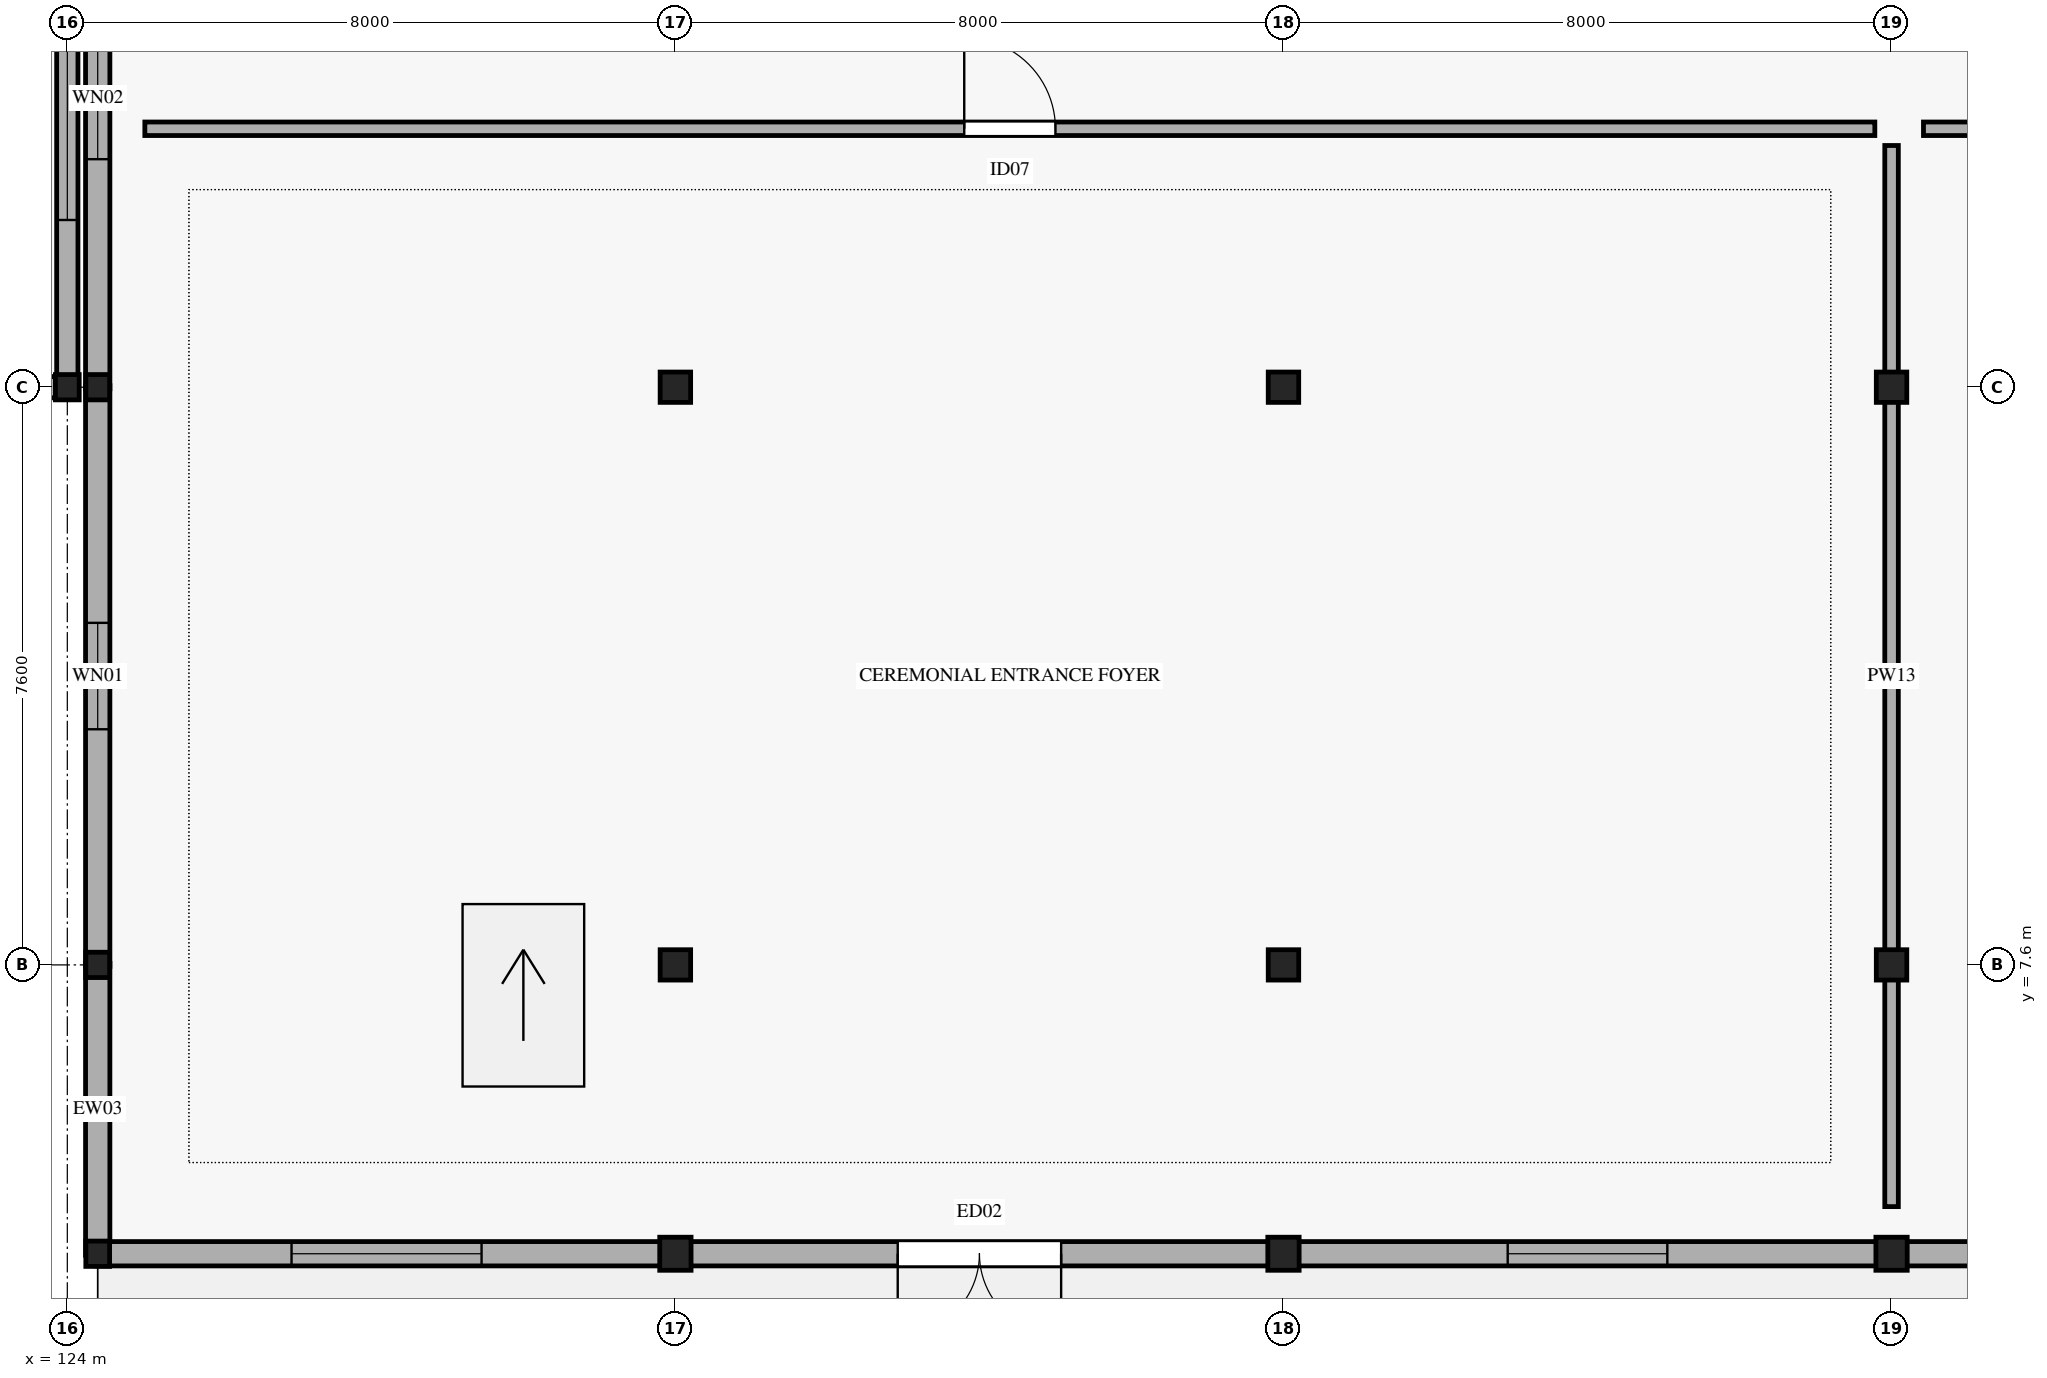
"""IFC4 building model, lengths in metres.
Left out: names, types, materials, properties, quantities, classifications, styles, units other than length and angle.
Written with IfcOpenShell. Run it as: python <this file> out.ifc"""

import sys

from ifc_helpers import new_model, si_unit, direction, frame, frame_2d, origin, origin_2d, place, context, subcontext, project, spatial, rectangle, i_section, extrude, element, fill, save


model = new_model("IFC4")
c1 = context("Model", 3, precision=1e-05, world=origin(), true_north=direction((0.0, 1.0)))
c2 = subcontext(c1, "Body", "Model", "MODEL_VIEW")
j1 = project(units=[si_unit("LENGTHUNIT", "METRE"), si_unit("PLANEANGLEUNIT", "RADIAN")], contexts=[c1])
p1 = place(None, origin())
s1 = spatial("IfcSite", under=j1, at=p1, CompositionType="ELEMENT")
p2 = place(p1, origin())
s2 = spatial("IfcBuilding", under=s1, at=p2, CompositionType="ELEMENT")
p3 = place(p2, origin())
s3 = spatial("IfcBuildingStorey", under=s2, at=p3, CompositionType="ELEMENT", Elevation=0.0)
for number, where, z_axis, x_axis in (
    (1, (124.4, 3.8, 0.0), (0.0, 0.0, 1.0), (1.0, 0.0, 0.0)),
    (2, (124.4, 7.6, 0.0), (0.0, 0.0, 1.0), (1.0, 0.0, 0.0)),
    (3, (124.4, 15.2, 0.0), (0.0, 0.0, 1.0), (1.0, 0.0, 0.0)),
):
    element("IfcColumn", number, at=place(p3, frame(where, z_axis=z_axis, x_axis=x_axis)), inside=s3, PredefinedType="COLUMN", context=c2, shape_type="SweptSolid", body=[
        extrude(i_section(OverallWidth=0.313, OverallDepth=0.333, WebThickness=0.018, FlangeThickness=0.028, FilletRadius=0.015, at=origin_2d()), origin(), (0.0, 0.0, 1.0), 5.185),
    ])
p4 = place(p3, frame((132.0, 3.8, 0.0), z_axis=(0.0, 0.0, 1.0), x_axis=(1.0, 0.0, 0.0)))
e4 = element("IfcColumn", 4, at=p4, inside=s3, PredefinedType="COLUMN", context=c2, shape_type="SweptSolid", body=[
    extrude(i_section(OverallWidth=0.412, OverallDepth=0.435, WebThickness=0.036, FlangeThickness=0.057, FilletRadius=0.015, at=origin_2d()), origin(), (0.0, 0.0, 1.0), 5.185),
])
for number, where, z_axis, x_axis in (
    (5, (132.0, 7.6, 0.0), (0.0, 0.0, 1.0), (1.0, 0.0, 0.0)),
    (6, (132.0, 15.2, 0.0), (0.0, 0.0, 1.0), (1.0, 0.0, 0.0)),
):
    element("IfcColumn", number, at=place(p3, frame(where, z_axis=z_axis, x_axis=x_axis)), inside=s3, PredefinedType="COLUMN", context=c2, shape_type="SweptSolid", body=[
        extrude(i_section(OverallWidth=0.401, OverallDepth=0.399, WebThickness=0.025, FlangeThickness=0.04, FilletRadius=0.015, at=origin_2d()), origin(), (0.0, 0.0, 1.0), 5.185),
    ])
p5 = place(p3, frame((140.0, 3.8, 0.0), z_axis=(0.0, 0.0, 1.0), x_axis=(1.0, 0.0, 0.0)))
e7 = element("IfcColumn", 7, at=p5, inside=s3, PredefinedType="COLUMN", context=c2, shape_type="SweptSolid", body=[
    extrude(i_section(OverallWidth=0.412, OverallDepth=0.435, WebThickness=0.036, FlangeThickness=0.057, FilletRadius=0.015, at=origin_2d()), origin(), (0.0, 0.0, 1.0), 5.185),
])
for number, where, z_axis, x_axis in (
    (8, (140.0, 7.6, 0.0), (0.0, 0.0, 1.0), (1.0, 0.0, 0.0)),
    (9, (140.0, 15.2, 0.0), (0.0, 0.0, 1.0), (1.0, 0.0, 0.0)),
):
    element("IfcColumn", number, at=place(p3, frame(where, z_axis=z_axis, x_axis=x_axis)), inside=s3, PredefinedType="COLUMN", context=c2, shape_type="SweptSolid", body=[
        extrude(i_section(OverallWidth=0.401, OverallDepth=0.399, WebThickness=0.025, FlangeThickness=0.04, FilletRadius=0.015, at=origin_2d()), origin(), (0.0, 0.0, 1.0), 5.185),
    ])
p6 = place(p3, frame((148.0, 3.8, 0.0), z_axis=(0.0, 0.0, 1.0), x_axis=(1.0, 0.0, 0.0)))
e10 = element("IfcColumn", 10, at=p6, inside=s3, PredefinedType="COLUMN", context=c2, shape_type="SweptSolid", body=[
    extrude(i_section(OverallWidth=0.412, OverallDepth=0.435, WebThickness=0.036, FlangeThickness=0.057, FilletRadius=0.015, at=origin_2d()), origin(), (0.0, 0.0, 1.0), 5.185),
])
for number, where, z_axis, x_axis in (
    (11, (148.0, 7.6, 0.0), (0.0, 0.0, 1.0), (1.0, 0.0, 0.0)),
    (12, (148.0, 15.2, 0.0), (0.0, 0.0, 1.0), (1.0, 0.0, 0.0)),
):
    element("IfcColumn", number, at=place(p3, frame(where, z_axis=z_axis, x_axis=x_axis)), inside=s3, PredefinedType="COLUMN", context=c2, shape_type="SweptSolid", body=[
        extrude(i_section(OverallWidth=0.401, OverallDepth=0.399, WebThickness=0.025, FlangeThickness=0.04, FilletRadius=0.015, at=origin_2d()), origin(), (0.0, 0.0, 1.0), 5.185),
    ])
p7 = place(p3, frame((124.0, 15.2, 0.0), z_axis=(0.0, 0.0, 1.0), x_axis=(1.0, 0.0, 0.0)))
e13 = element("IfcColumn", 13, at=p7, inside=s3, PredefinedType="COLUMN", context=c2, shape_type="SweptSolid", body=[
    extrude(i_section(OverallWidth=0.313, OverallDepth=0.333, WebThickness=0.018, FlangeThickness=0.028, FilletRadius=0.015, at=origin_2d()), origin(), (0.0, 0.0, 1.0), 5.185),
])
p8 = place(p3, frame((124.4, 3.78, 0.0), z_axis=(0.0, 0.0, 1.0), x_axis=(0.0, 1.0, 0.0)))
e14 = element("IfcWall", 14, at=p8, inside=s3, PredefinedType="STANDARD", context=c2, shape_type="SweptSolid", body=[
    extrude(rectangle(XDim=3.84, YDim=0.32, at=frame_2d((1.92, 0.0))), origin(), (0.0, 0.0, 1.0), 4.25),
])
p9 = place(p3, frame((124.4, 7.58, 0.0), z_axis=(0.0, 0.0, 1.0), x_axis=(0.0, 1.0, 0.0)))
e15 = element("IfcWall", 15, at=p9, inside=s3, PredefinedType="STANDARD", context=c2, shape_type="SweptSolid", body=[
    extrude(rectangle(XDim=7.64, YDim=0.32, at=frame_2d((3.82, 0.0))), origin(), (0.0, 0.0, 1.0), 4.25),
])
p10 = place(p9, frame((3.12, 0.0, 0.75)))
e16 = element("IfcOpeningElement", 16, at=p10, cuts=e15, PredefinedType="OPENING", context=c2, shape_type="SweptSolid", body=[
    extrude(rectangle(XDim=1.4, YDim=2.0, at=frame_2d((0.7, 1.0))), frame((0.0, 0.17, 0.0), z_axis=(0.0, -1.0, 0.0), x_axis=(1.0, 0.0, 0.0)), (0.0, 0.0, 1.0), 0.34),
])
p11 = place(p3, frame((124.4, 15.18, 0.0), z_axis=(0.0, 0.0, 1.0), x_axis=(0.0, 1.0, 0.0)))
e17 = element("IfcWall", 17, at=p11, inside=s3, PredefinedType="STANDARD", context=c2, shape_type="SweptSolid", body=[
    extrude(rectangle(XDim=7.64, YDim=0.32, at=frame_2d((3.82, 0.0))), origin(), (0.0, 0.0, 1.0), 4.25),
])
p12 = place(p11, frame((3.02, 0.0, 0.75)))
e18 = element("IfcOpeningElement", 18, at=p12, cuts=e17, PredefinedType="OPENING", context=c2, shape_type="SweptSolid", body=[
    extrude(rectangle(XDim=1.6, YDim=2.0, at=frame_2d((0.8, 1.0))), frame((0.0, 0.17, 0.0), z_axis=(0.0, -1.0, 0.0), x_axis=(1.0, 0.0, 0.0)), (0.0, 0.0, 1.0), 0.34),
])
p13 = place(p3, frame((156.02, 3.8, 0.0), z_axis=(0.0, 0.0, 1.0), x_axis=(-1.0, 0.0, 0.0)))
e19 = element("IfcWall", 19, at=p13, inside=s3, PredefinedType="STANDARD", context=c2, shape_type="SweptSolid", body=[
    extrude(rectangle(XDim=8.04, YDim=0.32, at=frame_2d((4.02, 0.0))), origin(), (0.0, 0.0, 1.0), 4.25),
])
p14 = place(p13, frame((3.145, 0.0, 0.75)))
e20 = element("IfcOpeningElement", 20, at=p14, cuts=e19, PredefinedType="OPENING", context=c2, shape_type="SweptSolid", body=[
    extrude(rectangle(XDim=1.75, YDim=2.15, at=frame_2d((0.875, 1.075))), frame((0.0, 0.17, 0.0), z_axis=(0.0, -1.0, 0.0), x_axis=(1.0, 0.0, 0.0)), (0.0, 0.0, 1.0), 0.34),
])
p15 = place(p3, frame((148.02, 3.8, 0.0), z_axis=(0.0, 0.0, 1.0), x_axis=(-1.0, 0.0, 0.0)))
e21 = element("IfcWall", 21, at=p15, inside=s3, PredefinedType="STANDARD", context=c2, shape_type="SweptSolid", body=[
    extrude(rectangle(XDim=8.04, YDim=0.32, at=frame_2d((4.02, 0.0))), origin(), (0.0, 0.0, 1.0), 4.25),
])
p16 = place(p15, frame((2.97, 0.0, 0.75)))
e22 = element("IfcOpeningElement", 22, at=p16, cuts=e21, PredefinedType="OPENING", context=c2, shape_type="SweptSolid", body=[
    extrude(rectangle(XDim=2.1, YDim=2.15, at=frame_2d((1.05, 1.075))), frame((0.0, 0.17, 0.0), z_axis=(0.0, -1.0, 0.0), x_axis=(1.0, 0.0, 0.0)), (0.0, 0.0, 1.0), 0.34),
])
p17 = place(p3, frame((140.02, 3.8, 0.0), z_axis=(0.0, 0.0, 1.0), x_axis=(-1.0, 0.0, 0.0)))
e23 = element("IfcWall", 23, at=p17, inside=s3, PredefinedType="STANDARD", context=c2, shape_type="SweptSolid", body=[
    extrude(rectangle(XDim=8.04, YDim=0.32, at=frame_2d((4.02, 0.0))), origin(), (0.0, 0.0, 1.0), 4.25),
])
p18 = place(p17, frame((2.945, 0.0, 0.0)))
e24 = element("IfcOpeningElement", 24, at=p18, cuts=e23, PredefinedType="OPENING", context=c2, shape_type="SweptSolid", body=[
    extrude(rectangle(XDim=2.15, YDim=2.55, at=frame_2d((1.075, 1.275))), frame((0.0, 0.17, 0.0), z_axis=(0.0, -1.0, 0.0), x_axis=(1.0, 0.0, 0.0)), (0.0, 0.0, 1.0), 0.34),
])
p19 = place(p3, frame((132.02, 3.8, 0.0), z_axis=(0.0, 0.0, 1.0), x_axis=(-1.0, 0.0, 0.0)))
e25 = element("IfcWall", 25, at=p19, inside=s3, PredefinedType="STANDARD", context=c2, shape_type="SweptSolid", body=[
    extrude(rectangle(XDim=7.64, YDim=0.32, at=frame_2d((3.82, 0.0))), origin(), (0.0, 0.0, 1.0), 4.25),
])
p20 = place(p19, frame((2.57, 0.0, 0.75)))
e26 = element("IfcOpeningElement", 26, at=p20, cuts=e25, PredefinedType="OPENING", context=c2, shape_type="SweptSolid", body=[
    extrude(rectangle(XDim=2.5, YDim=2.15, at=frame_2d((1.25, 1.075))), frame((0.0, 0.17, 0.0), z_axis=(0.0, -1.0, 0.0), x_axis=(1.0, 0.0, 0.0)), (0.0, 0.0, 1.0), 0.34),
])
p21 = place(p3, frame((124.0, 22.82, 0.0), z_axis=(0.0, 0.0, 1.0), x_axis=(0.0, -1.0, 0.0)))
e27 = element("IfcWall", 27, at=p21, inside=s3, PredefinedType="STANDARD", context=c2, shape_type="SweptSolid", body=[
    extrude(rectangle(XDim=7.64, YDim=0.28, at=frame_2d((3.82, 0.0))), origin(), (0.0, 0.0, 1.0), 4.25),
])
p22 = place(p21, frame((2.22, 0.0, 0.75)))
e28 = element("IfcOpeningElement", 28, at=p22, cuts=e27, PredefinedType="OPENING", context=c2, shape_type="SweptSolid", body=[
    extrude(rectangle(XDim=3.2, YDim=2.0, at=frame_2d((1.6, 1.0))), frame((0.0, 0.15, 0.0), z_axis=(0.0, -1.0, 0.0), x_axis=(1.0, 0.0, 0.0)), (0.0, 0.0, 1.0), 0.3),
])
p23 = place(p3, frame((124.02, 15.2, 0.0), z_axis=(0.0, 0.0, 1.0), x_axis=(-1.0, 0.0, 0.0)))
e29 = element("IfcWall", 29, at=p23, inside=s3, PredefinedType="STANDARD", context=c2, shape_type="SweptSolid", body=[
    extrude(rectangle(XDim=8.04, YDim=0.28, at=frame_2d((4.02, 0.0))), origin(), (0.0, 0.0, 1.0), 4.25),
])
p24 = place(p23, frame((3.27, 0.0, 0.75)))
e30 = element("IfcOpeningElement", 30, at=p24, cuts=e29, PredefinedType="OPENING", context=c2, shape_type="SweptSolid", body=[
    extrude(rectangle(XDim=1.5, YDim=2.15, at=frame_2d((0.75, 1.075))), frame((0.0, 0.15, 0.0), z_axis=(0.0, -1.0, 0.0), x_axis=(1.0, 0.0, 0.0)), (0.0, 0.0, 1.0), 0.3),
])
p25 = place(p3, frame((125.02, 18.6, 0.0), z_axis=(0.0, 0.0, 1.0), x_axis=(1.0, 0.0, 0.0)))
e31 = element("IfcWall", 31, at=p25, inside=s3, PredefinedType="PARTITIONING", context=c2, shape_type="SweptSolid", body=[
    extrude(rectangle(XDim=22.76, YDim=0.178, at=frame_2d((11.38, 0.0))), origin(), (0.0, 0.0, 1.0), 4.05),
])
p26 = place(p25, frame((10.78, 0.0, 0.0)))
e32 = element("IfcOpeningElement", 32, at=p26, cuts=e31, PredefinedType="OPENING", context=c2, shape_type="SweptSolid", body=[
    extrude(rectangle(XDim=1.2, YDim=2.2, at=frame_2d((0.6, 1.1))), frame((0.0, 0.099, 0.0), z_axis=(0.0, -1.0, 0.0), x_axis=(1.0, 0.0, 0.0)), (0.0, 0.0, 1.0), 0.198),
])
p27 = place(p3, frame((148.0, 4.42, 0.0), z_axis=(0.0, 0.0, 1.0), x_axis=(0.0, 1.0, 0.0)))
e33 = element("IfcWall", 33, at=p27, inside=s3, PredefinedType="PARTITIONING", context=c2, shape_type="SweptSolid", body=[
    extrude(rectangle(XDim=13.96, YDim=0.178, at=frame_2d((6.98, 0.0))), origin(), (0.0, 0.0, 1.0), 4.05),
])
p28 = place(p3, frame((148.42, 18.6, 0.0), z_axis=(0.0, 0.0, 1.0), x_axis=(1.0, 0.0, 0.0)))
e34 = element("IfcWall", 34, at=p28, inside=s3, PredefinedType="PARTITIONING", context=c2, shape_type="SweptSolid", body=[
    extrude(rectangle(XDim=11.36, YDim=0.178, at=frame_2d((5.68, 0.0))), origin(), (0.0, 0.0, 1.0), 4.05),
])
p29 = place(p28, frame((5.105, 0.0, 0.0)))
e35 = element("IfcOpeningElement", 35, at=p29, cuts=e34, PredefinedType="OPENING", context=c2, shape_type="SweptSolid", body=[
    extrude(rectangle(XDim=1.15, YDim=2.2, at=frame_2d((0.575, 1.1))), frame((0.0, 0.099, 0.0), z_axis=(0.0, -1.0, 0.0), x_axis=(1.0, 0.0, 0.0)), (0.0, 0.0, 1.0), 0.198),
])
p30 = place(p10, origin())
e36 = element("IfcWindow", 36, at=p30, inside=s3, PartitioningType="SINGLE_PANEL", PredefinedType="WINDOW", context=c2, shape_type="SweptSolid", body=[
    extrude(rectangle(XDim=1.4, YDim=2.0, at=frame_2d((0.7, 1.0))), frame((0.0, 0.03, 0.0), z_axis=(0.0, -1.0, 0.0), x_axis=(1.0, 0.0, 0.0)), (0.0, 0.0, 1.0), 0.06),
])
fill(e16, e36)
p31 = place(p12, origin())
e37 = element("IfcWindow", 37, at=p31, inside=s3, PartitioningType="SINGLE_PANEL", PredefinedType="WINDOW", context=c2, shape_type="SweptSolid", body=[
    extrude(rectangle(XDim=1.6, YDim=2.0, at=frame_2d((0.8, 1.0))), frame((0.0, 0.03, 0.0), z_axis=(0.0, -1.0, 0.0), x_axis=(1.0, 0.0, 0.0)), (0.0, 0.0, 1.0), 0.06),
])
fill(e18, e37)
p32 = place(p16, origin())
e38 = element("IfcWindow", 38, at=p32, inside=s3, PartitioningType="SINGLE_PANEL", PredefinedType="WINDOW", context=c2, shape_type="SweptSolid", body=[
    extrude(rectangle(XDim=2.1, YDim=2.15, at=frame_2d((1.05, 1.075))), frame((0.0, 0.03, 0.0), z_axis=(0.0, -1.0, 0.0), x_axis=(1.0, 0.0, 0.0)), (0.0, 0.0, 1.0), 0.06),
])
fill(e22, e38)
p33 = place(p18, origin())
e39 = element("IfcDoor", 39, at=p33, inside=s3, OperationType="DOUBLE_DOOR_SINGLE_SWING", PredefinedType="DOOR", context=c2, shape_type="SweptSolid", body=[
    extrude(rectangle(XDim=2.15, YDim=2.55, at=frame_2d((1.075, 1.275))), frame((0.0, 0.025, 0.0), z_axis=(0.0, -1.0, 0.0), x_axis=(1.0, 0.0, 0.0)), (0.0, 0.0, 1.0), 0.05),
])
fill(e24, e39)
p34 = place(p20, origin())
e40 = element("IfcWindow", 40, at=p34, inside=s3, PartitioningType="SINGLE_PANEL", PredefinedType="WINDOW", context=c2, shape_type="SweptSolid", body=[
    extrude(rectangle(XDim=2.5, YDim=2.15, at=frame_2d((1.25, 1.075))), frame((0.0, 0.03, 0.0), z_axis=(0.0, -1.0, 0.0), x_axis=(1.0, 0.0, 0.0)), (0.0, 0.0, 1.0), 0.06),
])
fill(e26, e40)
p35 = place(p22, origin())
e41 = element("IfcWindow", 41, at=p35, inside=s3, PartitioningType="SINGLE_PANEL", PredefinedType="WINDOW", context=c2, shape_type="SweptSolid", body=[
    extrude(rectangle(XDim=3.2, YDim=2.0, at=frame_2d((1.6, 1.0))), frame((0.0, 0.03, 0.0), z_axis=(0.0, -1.0, 0.0), x_axis=(1.0, 0.0, 0.0)), (0.0, 0.0, 1.0), 0.06),
])
fill(e28, e41)
p36 = place(p26, origin())
e42 = element("IfcDoor", 42, at=p36, inside=s3, OperationType="SINGLE_SWING_LEFT", PredefinedType="DOOR", context=c2, shape_type="SweptSolid", body=[
    extrude(rectangle(XDim=1.2, YDim=2.2, at=frame_2d((0.6, 1.1))), frame((0.0, 0.025, 0.0), z_axis=(0.0, -1.0, 0.0), x_axis=(1.0, 0.0, 0.0)), (0.0, 0.0, 1.0), 0.05),
])
fill(e32, e42)
save(model, sys.argv[1])
